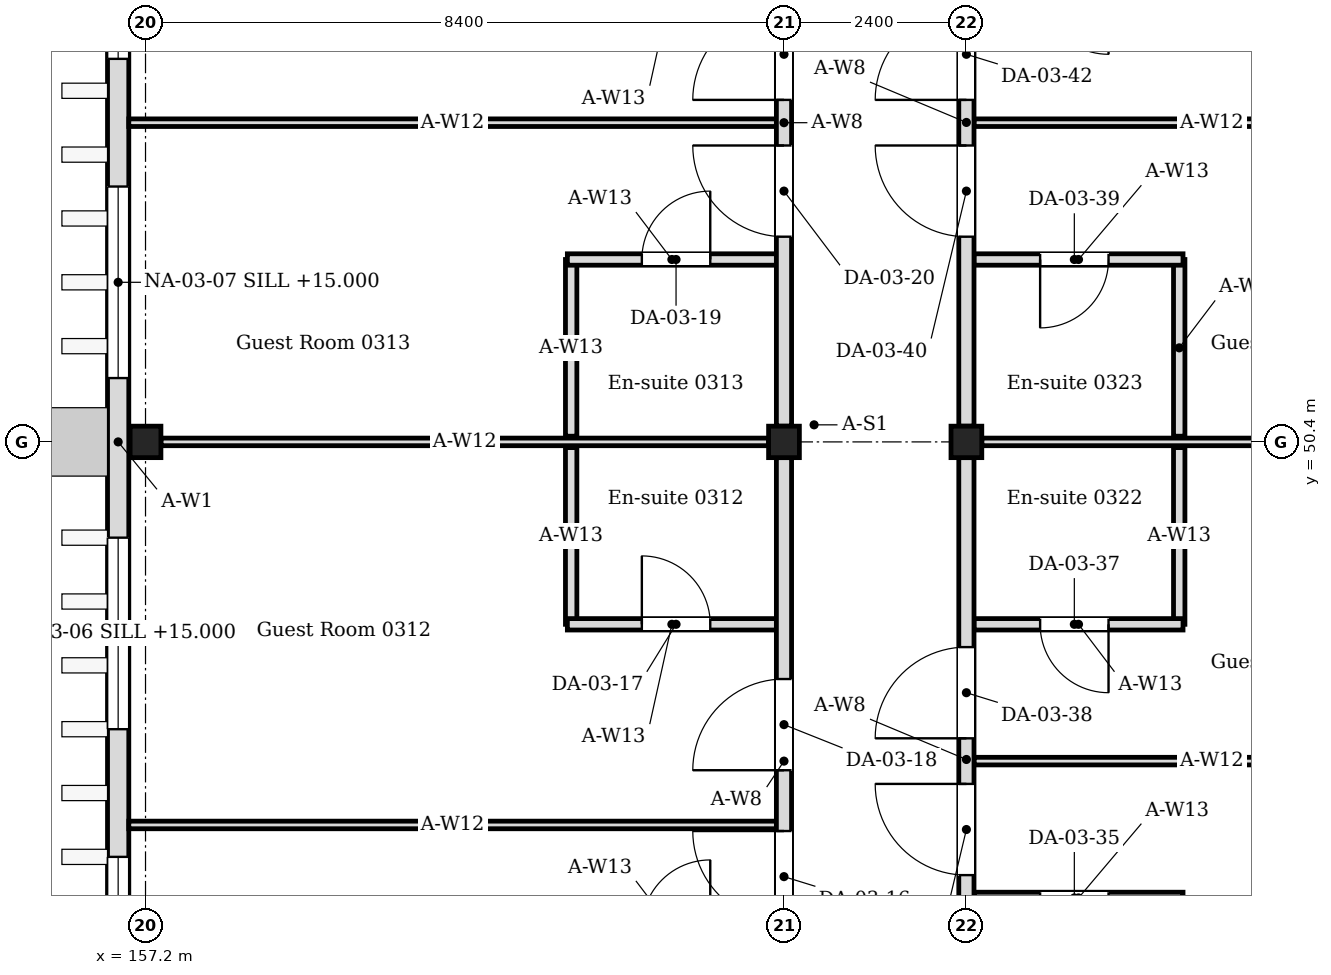
"""IFC4 building model, lengths in metres.
Left out: names, types, materials, properties, quantities, classifications, styles, units other than length and angle.
Written with IfcOpenShell. Run it as: python <this file> out.ifc"""

import sys

from ifc_helpers import new_model, si_unit, direction, frame, frame_2d, origin, origin_2d, place, context, subcontext, project, spatial, rectangle, i_section, extrude, element, fill, save


model = new_model("IFC4")
c1 = context("Model", 3, precision=1e-05, world=origin(), true_north=direction((0.0, 1.0)))
c2 = subcontext(c1, "Body", "Model", "MODEL_VIEW")
j1 = project(units=[si_unit("LENGTHUNIT", "METRE"), si_unit("PLANEANGLEUNIT", "RADIAN")], contexts=[c1])
p1 = place(None, origin())
s1 = spatial("IfcSite", under=j1, at=p1, CompositionType="ELEMENT")
p2 = place(p1, origin())
s2 = spatial("IfcBuilding", under=s1, at=p2, CompositionType="ELEMENT")
p3 = place(p2, frame((0.0, 0.0, 14.4)))
s3 = spatial("IfcBuildingStorey", under=s2, at=p3, CompositionType="ELEMENT", Elevation=14.4)
for number, where, z_axis, x_axis in (
    (1, (157.2, 50.4, 0.0), (0.0, 0.0, 1.0), (1.0, 0.0, 0.0)),
    (2, (165.6, 50.4, 0.0), (0.0, 0.0, 1.0), (1.0, 0.0, 0.0)),
    (3, (168.0, 50.4, 0.0), (0.0, 0.0, 1.0), (1.0, 0.0, 0.0)),
):
    element("IfcColumn", number, at=place(p3, frame(where, z_axis=z_axis, x_axis=x_axis)), inside=s3, PredefinedType="COLUMN", context=c2, shape_type="SweptSolid", body=[
        extrude(i_section(OverallWidth=0.405, OverallDepth=0.414, WebThickness=0.018, FlangeThickness=0.028, FilletRadius=0.022, at=origin_2d()), origin(), (0.0, 0.0, 1.0), 4.2),
    ])
p4 = place(p3, frame((156.84, 41.65, 0.0), z_axis=(0.0, 0.0, 1.0), x_axis=(0.0, 1.0, 0.0)))
e4 = element("IfcWall", 4, at=p4, inside=s3, PredefinedType="SOLIDWALL", context=c2, shape_type="SweptSolid", body=[
    extrude(rectangle(XDim=17.5, YDim=0.28, at=frame_2d((8.75, 0.0))), origin(), (0.0, 0.0, 1.0), 4.05),
])
p5 = place(p4, frame((0.77, 0.0, 0.6)))
e5 = element("IfcOpeningElement", 5, at=p5, cuts=e4, PredefinedType="OPENING", context=c2, shape_type="SweptSolid", body=[
    extrude(rectangle(XDim=2.52, YDim=2.4, at=frame_2d((1.26, 1.2))), frame((0.0, 0.15, 0.0), z_axis=(0.0, -1.0, 0.0), x_axis=(1.0, 0.0, 0.0)), (0.0, 0.0, 1.0), 0.3),
])
p6 = place(p4, frame((4.97, 0.0, 0.6)))
e6 = element("IfcOpeningElement", 6, at=p6, cuts=e4, PredefinedType="OPENING", context=c2, shape_type="SweptSolid", body=[
    extrude(rectangle(XDim=2.52, YDim=2.4, at=frame_2d((1.26, 1.2))), frame((0.0, 0.15, 0.0), z_axis=(0.0, -1.0, 0.0), x_axis=(1.0, 0.0, 0.0)), (0.0, 0.0, 1.0), 0.3),
])
p7 = place(p4, frame((9.59, 0.0, 0.6)))
e7 = element("IfcOpeningElement", 7, at=p7, cuts=e4, PredefinedType="OPENING", context=c2, shape_type="SweptSolid", body=[
    extrude(rectangle(XDim=2.52, YDim=2.4, at=frame_2d((1.26, 1.2))), frame((0.0, 0.15, 0.0), z_axis=(0.0, -1.0, 0.0), x_axis=(1.0, 0.0, 0.0)), (0.0, 0.0, 1.0), 0.3),
])
p8 = place(p4, frame((13.79, 0.0, 0.6)))
e8 = element("IfcOpeningElement", 8, at=p8, cuts=e4, PredefinedType="OPENING", context=c2, shape_type="SweptSolid", body=[
    extrude(rectangle(XDim=2.52, YDim=2.4, at=frame_2d((1.26, 1.2))), frame((0.0, 0.15, 0.0), z_axis=(0.0, -1.0, 0.0), x_axis=(1.0, 0.0, 0.0)), (0.0, 0.0, 1.0), 0.3),
])
p9 = place(p3, frame((162.8, 48.0, 0.0), z_axis=(0.0, 0.0, 1.0), x_axis=(0.0, 1.0, 0.0)))
e9 = element("IfcWall", 9, at=p9, inside=s3, PredefinedType="PARTITIONING", context=c2, shape_type="SweptSolid", body=[
    extrude(rectangle(XDim=2.325, YDim=0.15, at=frame_2d((1.163, 0.0))), origin(), (0.0, 0.0, 1.0), 4.05),
])
p10 = place(p3, frame((162.75, 48.0, 0.0), z_axis=(0.0, 0.0, 1.0), x_axis=(1.0, 0.0, 0.0)))
e10 = element("IfcWall", 10, at=p10, inside=s3, PredefinedType="PARTITIONING", context=c2, shape_type="SweptSolid", body=[
    extrude(rectangle(XDim=2.75, YDim=0.15, at=frame_2d((1.375, 0.0))), origin(), (0.0, 0.0, 1.0), 4.05),
])
p11 = place(p10, frame((0.98, 0.0, 0.0)))
e11 = element("IfcOpeningElement", 11, at=p11, cuts=e10, PredefinedType="OPENING", context=c2, shape_type="SweptSolid", body=[
    extrude(rectangle(XDim=0.9, YDim=2.1, at=frame_2d((0.45, 1.05))), frame((0.0, 0.085, 0.0), z_axis=(0.0, -1.0, 0.0), x_axis=(1.0, 0.0, 0.0)), (0.0, 0.0, 1.0), 0.17),
])
p12 = place(p3, frame((162.8, 50.475, 0.0), z_axis=(0.0, 0.0, 1.0), x_axis=(0.0, 1.0, 0.0)))
e12 = element("IfcWall", 12, at=p12, inside=s3, PredefinedType="PARTITIONING", context=c2, shape_type="SweptSolid", body=[
    extrude(rectangle(XDim=2.325, YDim=0.15, at=frame_2d((1.163, 0.0))), origin(), (0.0, 0.0, 1.0), 4.05),
])
p13 = place(p3, frame((162.75, 52.8, 0.0), z_axis=(0.0, 0.0, 1.0), x_axis=(1.0, 0.0, 0.0)))
e13 = element("IfcWall", 13, at=p13, inside=s3, PredefinedType="PARTITIONING", context=c2, shape_type="SweptSolid", body=[
    extrude(rectangle(XDim=2.75, YDim=0.15, at=frame_2d((1.375, 0.0))), origin(), (0.0, 0.0, 1.0), 4.05),
])
p14 = place(p13, frame((0.98, 0.0, 0.0)))
e14 = element("IfcOpeningElement", 14, at=p14, cuts=e13, PredefinedType="OPENING", context=c2, shape_type="SweptSolid", body=[
    extrude(rectangle(XDim=0.9, YDim=2.1, at=frame_2d((0.45, 1.05))), frame((0.0, 0.085, 0.0), z_axis=(0.0, -1.0, 0.0), x_axis=(1.0, 0.0, 0.0)), (0.0, 0.0, 1.0), 0.17),
])
p15 = place(p3, frame((170.85, 44.4, 0.0), z_axis=(0.0, 0.0, 1.0), x_axis=(-1.0, 0.0, 0.0)))
e15 = element("IfcWall", 15, at=p15, inside=s3, PredefinedType="PARTITIONING", context=c2, shape_type="SweptSolid", body=[
    extrude(rectangle(XDim=2.75, YDim=0.15, at=frame_2d((1.375, 0.0))), origin(), (0.0, 0.0, 1.0), 4.05),
])
p16 = place(p15, frame((0.98, 0.0, 0.0)))
e16 = element("IfcOpeningElement", 16, at=p16, cuts=e15, PredefinedType="OPENING", context=c2, shape_type="SweptSolid", body=[
    extrude(rectangle(XDim=0.9, YDim=2.1, at=frame_2d((0.45, 1.05))), frame((0.0, 0.085, 0.0), z_axis=(0.0, -1.0, 0.0), x_axis=(1.0, 0.0, 0.0)), (0.0, 0.0, 1.0), 0.17),
])
p17 = place(p3, frame((170.8, 48.0, 0.0), z_axis=(0.0, 0.0, 1.0), x_axis=(0.0, 1.0, 0.0)))
e17 = element("IfcWall", 17, at=p17, inside=s3, PredefinedType="PARTITIONING", context=c2, shape_type="SweptSolid", body=[
    extrude(rectangle(XDim=2.325, YDim=0.15, at=frame_2d((1.163, 0.0))), origin(), (0.0, 0.0, 1.0), 4.05),
])
p18 = place(p3, frame((170.85, 48.0, 0.0), z_axis=(0.0, 0.0, 1.0), x_axis=(-1.0, 0.0, 0.0)))
e18 = element("IfcWall", 18, at=p18, inside=s3, PredefinedType="PARTITIONING", context=c2, shape_type="SweptSolid", body=[
    extrude(rectangle(XDim=2.75, YDim=0.15, at=frame_2d((1.375, 0.0))), origin(), (0.0, 0.0, 1.0), 4.05),
])
p19 = place(p18, frame((0.98, 0.0, 0.0)))
e19 = element("IfcOpeningElement", 19, at=p19, cuts=e18, PredefinedType="OPENING", context=c2, shape_type="SweptSolid", body=[
    extrude(rectangle(XDim=0.9, YDim=2.1, at=frame_2d((0.45, 1.05))), frame((0.0, 0.085, 0.0), z_axis=(0.0, -1.0, 0.0), x_axis=(1.0, 0.0, 0.0)), (0.0, 0.0, 1.0), 0.17),
])
p20 = place(p3, frame((170.8, 50.475, 0.0), z_axis=(0.0, 0.0, 1.0), x_axis=(0.0, 1.0, 0.0)))
e20 = element("IfcWall", 20, at=p20, inside=s3, PredefinedType="PARTITIONING", context=c2, shape_type="SweptSolid", body=[
    extrude(rectangle(XDim=2.325, YDim=0.15, at=frame_2d((1.163, 0.0))), origin(), (0.0, 0.0, 1.0), 4.05),
])
p21 = place(p3, frame((170.85, 52.8, 0.0), z_axis=(0.0, 0.0, 1.0), x_axis=(-1.0, 0.0, 0.0)))
e21 = element("IfcWall", 21, at=p21, inside=s3, PredefinedType="PARTITIONING", context=c2, shape_type="SweptSolid", body=[
    extrude(rectangle(XDim=2.75, YDim=0.15, at=frame_2d((1.375, 0.0))), origin(), (0.0, 0.0, 1.0), 4.05),
])
p22 = place(p21, frame((0.98, 0.0, 0.0)))
e22 = element("IfcOpeningElement", 22, at=p22, cuts=e21, PredefinedType="OPENING", context=c2, shape_type="SweptSolid", body=[
    extrude(rectangle(XDim=0.9, YDim=2.1, at=frame_2d((0.45, 1.05))), frame((0.0, 0.085, 0.0), z_axis=(0.0, -1.0, 0.0), x_axis=(1.0, 0.0, 0.0)), (0.0, 0.0, 1.0), 0.17),
])
p23 = place(p3, frame((157.403, 50.4, 0.0), z_axis=(0.0, 0.0, 1.0), x_axis=(1.0, 0.0, 0.0)))
e23 = element("IfcWall", 23, at=p23, inside=s3, PredefinedType="PARTITIONING", context=c2, shape_type="SweptSolid", body=[
    extrude(rectangle(XDim=7.995, YDim=0.1, at=frame_2d((3.998, 0.0))), origin(), (0.0, 0.0, 1.0), 3.604),
])
p24 = place(p3, frame((168.202, 50.4, 0.0), z_axis=(0.0, 0.0, 1.0), x_axis=(1.0, 0.0, 0.0)))
e24 = element("IfcWall", 24, at=p24, inside=s3, PredefinedType="PARTITIONING", context=c2, shape_type="SweptSolid", body=[
    extrude(rectangle(XDim=7.995, YDim=0.1, at=frame_2d((3.998, 0.0))), origin(), (0.0, 0.0, 1.0), 3.604),
])
for number, where, z_axis, x_axis in (
    (25, (156.98, 45.36, 0.0), (0.0, 0.0, 1.0), (1.0, 0.0, 0.0)),
    (26, (156.98, 54.6, 0.0), (0.0, 0.0, 1.0), (1.0, 0.0, 0.0)),
):
    element("IfcWall", number, at=place(p3, frame(where, z_axis=z_axis, x_axis=x_axis)), inside=s3, PredefinedType="PARTITIONING", context=c2, shape_type="SweptSolid", body=[
        extrude(rectangle(XDim=8.52, YDim=0.1, at=frame_2d((4.26, 0.0))), origin(), (0.0, 0.0, 1.0), 3.604),
    ])
for number, where, z_axis, x_axis in (
    (27, (168.1, 46.2, 0.0), (0.0, 0.0, 1.0), (1.0, 0.0, 0.0)),
    (28, (168.1, 54.6, 0.0), (0.0, 0.0, 1.0), (1.0, 0.0, 0.0)),
):
    element("IfcWall", number, at=place(p3, frame(where, z_axis=z_axis, x_axis=x_axis)), inside=s3, PredefinedType="PARTITIONING", context=c2, shape_type="SweptSolid", body=[
        extrude(rectangle(XDim=6.26, YDim=0.1, at=frame_2d((3.13, 0.0))), origin(), (0.0, 0.0, 1.0), 3.604),
    ])
p25 = place(p3, frame((165.6, 42.207, 0.0), z_axis=(0.0, 0.0, 1.0), x_axis=(0.0, 1.0, 0.0)))
e29 = element("IfcWall", 29, at=p25, inside=s3, PredefinedType="PARTITIONING", context=c2, shape_type="SweptSolid", body=[
    extrude(rectangle(XDim=7.986, YDim=0.2, at=frame_2d((3.993, 0.0))), origin(), (0.0, 0.0, 1.0), 3.45),
])
p26 = place(p25, frame((1.873, 0.0, 0.0)))
e30 = element("IfcOpeningElement", 30, at=p26, cuts=e29, PredefinedType="OPENING", context=c2, shape_type="SweptSolid", body=[
    extrude(rectangle(XDim=1.2, YDim=2.1, at=frame_2d((0.6, 1.05))), frame((0.0, 0.11, 0.0), z_axis=(0.0, -1.0, 0.0), x_axis=(1.0, 0.0, 0.0)), (0.0, 0.0, 1.0), 0.22),
])
p27 = place(p25, frame((3.873, 0.0, 0.0)))
e31 = element("IfcOpeningElement", 31, at=p27, cuts=e29, PredefinedType="OPENING", context=c2, shape_type="SweptSolid", body=[
    extrude(rectangle(XDim=1.2, YDim=2.1, at=frame_2d((0.6, 1.05))), frame((0.0, 0.11, 0.0), z_axis=(0.0, -1.0, 0.0), x_axis=(1.0, 0.0, 0.0)), (0.0, 0.0, 1.0), 0.22),
])
p28 = place(p3, frame((165.6, 50.607, 0.0), z_axis=(0.0, 0.0, 1.0), x_axis=(0.0, 1.0, 0.0)))
e32 = element("IfcWall", 32, at=p28, inside=s3, PredefinedType="PARTITIONING", context=c2, shape_type="SweptSolid", body=[
    extrude(rectangle(XDim=7.986, YDim=0.2, at=frame_2d((3.993, 0.0))), origin(), (0.0, 0.0, 1.0), 3.45),
])
p29 = place(p28, frame((2.493, 0.0, 0.0)))
e33 = element("IfcOpeningElement", 33, at=p29, cuts=e32, PredefinedType="OPENING", context=c2, shape_type="SweptSolid", body=[
    extrude(rectangle(XDim=1.2, YDim=2.1, at=frame_2d((0.6, 1.05))), frame((0.0, 0.11, 0.0), z_axis=(0.0, -1.0, 0.0), x_axis=(1.0, 0.0, 0.0)), (0.0, 0.0, 1.0), 0.22),
])
p30 = place(p28, frame((4.293, 0.0, 0.0)))
e34 = element("IfcOpeningElement", 34, at=p30, cuts=e32, PredefinedType="OPENING", context=c2, shape_type="SweptSolid", body=[
    extrude(rectangle(XDim=1.2, YDim=2.1, at=frame_2d((0.6, 1.05))), frame((0.0, 0.11, 0.0), z_axis=(0.0, -1.0, 0.0), x_axis=(1.0, 0.0, 0.0)), (0.0, 0.0, 1.0), 0.22),
])
p31 = place(p3, frame((168.0, 42.25, 0.0), z_axis=(0.0, 0.0, 1.0), x_axis=(0.0, 1.0, 0.0)))
e35 = element("IfcWall", 35, at=p31, inside=s3, PredefinedType="PARTITIONING", context=c2, shape_type="SweptSolid", body=[
    extrude(rectangle(XDim=7.943, YDim=0.2, at=frame_2d((3.972, 0.0))), origin(), (0.0, 0.0, 1.0), 3.45),
])
p32 = place(p31, frame((2.45, 0.0, 0.0)))
e36 = element("IfcOpeningElement", 36, at=p32, cuts=e35, PredefinedType="OPENING", context=c2, shape_type="SweptSolid", body=[
    extrude(rectangle(XDim=1.2, YDim=2.1, at=frame_2d((0.6, 1.05))), frame((0.0, 0.11, 0.0), z_axis=(0.0, -1.0, 0.0), x_axis=(1.0, 0.0, 0.0)), (0.0, 0.0, 1.0), 0.22),
])
p33 = place(p31, frame((4.25, 0.0, 0.0)))
e37 = element("IfcOpeningElement", 37, at=p33, cuts=e35, PredefinedType="OPENING", context=c2, shape_type="SweptSolid", body=[
    extrude(rectangle(XDim=1.2, YDim=2.1, at=frame_2d((0.6, 1.05))), frame((0.0, 0.11, 0.0), z_axis=(0.0, -1.0, 0.0), x_axis=(1.0, 0.0, 0.0)), (0.0, 0.0, 1.0), 0.22),
])
p34 = place(p3, frame((168.0, 50.607, 0.0), z_axis=(0.0, 0.0, 1.0), x_axis=(0.0, 1.0, 0.0)))
e38 = element("IfcWall", 38, at=p34, inside=s3, PredefinedType="PARTITIONING", context=c2, shape_type="SweptSolid", body=[
    extrude(rectangle(XDim=7.993, YDim=0.2, at=frame_2d((3.997, 0.0))), origin(), (0.0, 0.0, 1.0), 3.45),
])
p35 = place(p34, frame((2.493, 0.0, 0.0)))
e39 = element("IfcOpeningElement", 39, at=p35, cuts=e38, PredefinedType="OPENING", context=c2, shape_type="SweptSolid", body=[
    extrude(rectangle(XDim=1.2, YDim=2.1, at=frame_2d((0.6, 1.05))), frame((0.0, 0.11, 0.0), z_axis=(0.0, -1.0, 0.0), x_axis=(1.0, 0.0, 0.0)), (0.0, 0.0, 1.0), 0.22),
])
p36 = place(p34, frame((4.293, 0.0, 0.0)))
e40 = element("IfcOpeningElement", 40, at=p36, cuts=e38, PredefinedType="OPENING", context=c2, shape_type="SweptSolid", body=[
    extrude(rectangle(XDim=1.2, YDim=2.1, at=frame_2d((0.6, 1.05))), frame((0.0, 0.11, 0.0), z_axis=(0.0, -1.0, 0.0), x_axis=(1.0, 0.0, 0.0)), (0.0, 0.0, 1.0), 0.22),
])
p37 = place(p5, origin())
e41 = element("IfcWindow", 41, at=p37, inside=s3, PartitioningType="SINGLE_PANEL", PredefinedType="WINDOW", context=c2, shape_type="SweptSolid", body=[
    extrude(rectangle(XDim=2.52, YDim=2.4, at=frame_2d((1.26, 1.2))), frame((0.0, 0.03, 0.0), z_axis=(0.0, -1.0, 0.0), x_axis=(1.0, 0.0, 0.0)), (0.0, 0.0, 1.0), 0.06),
])
fill(e5, e41)
p38 = place(p6, origin())
e42 = element("IfcWindow", 42, at=p38, inside=s3, PartitioningType="SINGLE_PANEL", PredefinedType="WINDOW", context=c2, shape_type="SweptSolid", body=[
    extrude(rectangle(XDim=2.52, YDim=2.4, at=frame_2d((1.26, 1.2))), frame((0.0, 0.03, 0.0), z_axis=(0.0, -1.0, 0.0), x_axis=(1.0, 0.0, 0.0)), (0.0, 0.0, 1.0), 0.06),
])
fill(e6, e42)
p39 = place(p7, origin())
e43 = element("IfcWindow", 43, at=p39, inside=s3, PartitioningType="SINGLE_PANEL", PredefinedType="WINDOW", context=c2, shape_type="SweptSolid", body=[
    extrude(rectangle(XDim=2.52, YDim=2.4, at=frame_2d((1.26, 1.2))), frame((0.0, 0.03, 0.0), z_axis=(0.0, -1.0, 0.0), x_axis=(1.0, 0.0, 0.0)), (0.0, 0.0, 1.0), 0.06),
])
fill(e7, e43)
p40 = place(p8, origin())
e44 = element("IfcWindow", 44, at=p40, inside=s3, PartitioningType="SINGLE_PANEL", PredefinedType="WINDOW", context=c2, shape_type="SweptSolid", body=[
    extrude(rectangle(XDim=2.52, YDim=2.4, at=frame_2d((1.26, 1.2))), frame((0.0, 0.03, 0.0), z_axis=(0.0, -1.0, 0.0), x_axis=(1.0, 0.0, 0.0)), (0.0, 0.0, 1.0), 0.06),
])
fill(e8, e44)
p41 = place(p26, origin())
e45 = element("IfcDoor", 45, at=p41, inside=s3, OperationType="SINGLE_SWING_RIGHT", PredefinedType="DOOR", context=c2, shape_type="SweptSolid", body=[
    extrude(rectangle(XDim=1.2, YDim=2.1, at=frame_2d((0.6, 1.05))), frame((0.0, 0.025, 0.0), z_axis=(0.0, -1.0, 0.0), x_axis=(1.0, 0.0, 0.0)), (0.0, 0.0, 1.0), 0.05),
])
fill(e30, e45)
p42 = place(p11, origin())
e46 = element("IfcDoor", 46, at=p42, inside=s3, OperationType="SINGLE_SWING_LEFT", PredefinedType="DOOR", context=c2, shape_type="SweptSolid", body=[
    extrude(rectangle(XDim=0.9, YDim=2.1, at=frame_2d((0.45, 1.05))), frame((0.0, 0.025, 0.0), z_axis=(0.0, -1.0, 0.0), x_axis=(1.0, 0.0, 0.0)), (0.0, 0.0, 1.0), 0.05),
])
fill(e11, e46)
p43 = place(p27, origin())
e47 = element("IfcDoor", 47, at=p43, inside=s3, OperationType="SINGLE_SWING_LEFT", PredefinedType="DOOR", context=c2, shape_type="SweptSolid", body=[
    extrude(rectangle(XDim=1.2, YDim=2.1, at=frame_2d((0.6, 1.05))), frame((0.0, 0.025, 0.0), z_axis=(0.0, -1.0, 0.0), x_axis=(1.0, 0.0, 0.0)), (0.0, 0.0, 1.0), 0.05),
])
fill(e31, e47)
p44 = place(p14, origin())
e48 = element("IfcDoor", 48, at=p44, inside=s3, OperationType="SINGLE_SWING_RIGHT", PredefinedType="DOOR", context=c2, shape_type="SweptSolid", body=[
    extrude(rectangle(XDim=0.9, YDim=2.1, at=frame_2d((0.45, 1.05))), frame((0.0, 0.025, 0.0), z_axis=(0.0, -1.0, 0.0), x_axis=(1.0, 0.0, 0.0)), (0.0, 0.0, 1.0), 0.05),
])
fill(e14, e48)
p45 = place(p29, origin())
e49 = element("IfcDoor", 49, at=p45, inside=s3, OperationType="SINGLE_SWING_RIGHT", PredefinedType="DOOR", context=c2, shape_type="SweptSolid", body=[
    extrude(rectangle(XDim=1.2, YDim=2.1, at=frame_2d((0.6, 1.05))), frame((0.0, 0.025, 0.0), z_axis=(0.0, -1.0, 0.0), x_axis=(1.0, 0.0, 0.0)), (0.0, 0.0, 1.0), 0.05),
])
fill(e33, e49)
p46 = place(p30, origin())
e50 = element("IfcDoor", 50, at=p46, inside=s3, OperationType="SINGLE_SWING_LEFT", PredefinedType="DOOR", context=c2, shape_type="SweptSolid", body=[
    extrude(rectangle(XDim=1.2, YDim=2.1, at=frame_2d((0.6, 1.05))), frame((0.0, 0.025, 0.0), z_axis=(0.0, -1.0, 0.0), x_axis=(1.0, 0.0, 0.0)), (0.0, 0.0, 1.0), 0.05),
])
fill(e34, e50)
p47 = place(p32, origin())
e51 = element("IfcDoor", 51, at=p47, inside=s3, OperationType="SINGLE_SWING_RIGHT", PredefinedType="DOOR", context=c2, shape_type="SweptSolid", body=[
    extrude(rectangle(XDim=1.2, YDim=2.1, at=frame_2d((0.6, 1.05))), frame((0.0, 0.025, 0.0), z_axis=(0.0, -1.0, 0.0), x_axis=(1.0, 0.0, 0.0)), (0.0, 0.0, 1.0), 0.05),
])
fill(e36, e51)
p48 = place(p19, origin())
e52 = element("IfcDoor", 52, at=p48, inside=s3, OperationType="SINGLE_SWING_LEFT", PredefinedType="DOOR", context=c2, shape_type="SweptSolid", body=[
    extrude(rectangle(XDim=0.9, YDim=2.1, at=frame_2d((0.45, 1.05))), frame((0.0, 0.025, 0.0), z_axis=(0.0, -1.0, 0.0), x_axis=(1.0, 0.0, 0.0)), (0.0, 0.0, 1.0), 0.05),
])
fill(e19, e52)
p49 = place(p33, origin())
e53 = element("IfcDoor", 53, at=p49, inside=s3, OperationType="SINGLE_SWING_LEFT", PredefinedType="DOOR", context=c2, shape_type="SweptSolid", body=[
    extrude(rectangle(XDim=1.2, YDim=2.1, at=frame_2d((0.6, 1.05))), frame((0.0, 0.025, 0.0), z_axis=(0.0, -1.0, 0.0), x_axis=(1.0, 0.0, 0.0)), (0.0, 0.0, 1.0), 0.05),
])
fill(e37, e53)
p50 = place(p22, origin())
e54 = element("IfcDoor", 54, at=p50, inside=s3, OperationType="SINGLE_SWING_RIGHT", PredefinedType="DOOR", context=c2, shape_type="SweptSolid", body=[
    extrude(rectangle(XDim=0.9, YDim=2.1, at=frame_2d((0.45, 1.05))), frame((0.0, 0.025, 0.0), z_axis=(0.0, -1.0, 0.0), x_axis=(1.0, 0.0, 0.0)), (0.0, 0.0, 1.0), 0.05),
])
fill(e22, e54)
p51 = place(p35, origin())
e55 = element("IfcDoor", 55, at=p51, inside=s3, OperationType="SINGLE_SWING_RIGHT", PredefinedType="DOOR", context=c2, shape_type="SweptSolid", body=[
    extrude(rectangle(XDim=1.2, YDim=2.1, at=frame_2d((0.6, 1.05))), frame((0.0, 0.025, 0.0), z_axis=(0.0, -1.0, 0.0), x_axis=(1.0, 0.0, 0.0)), (0.0, 0.0, 1.0), 0.05),
])
fill(e39, e55)
p52 = place(p36, origin())
e56 = element("IfcDoor", 56, at=p52, inside=s3, OperationType="SINGLE_SWING_LEFT", PredefinedType="DOOR", context=c2, shape_type="SweptSolid", body=[
    extrude(rectangle(XDim=1.2, YDim=2.1, at=frame_2d((0.6, 1.05))), frame((0.0, 0.025, 0.0), z_axis=(0.0, -1.0, 0.0), x_axis=(1.0, 0.0, 0.0)), (0.0, 0.0, 1.0), 0.05),
])
fill(e40, e56)
save(model, sys.argv[1])
